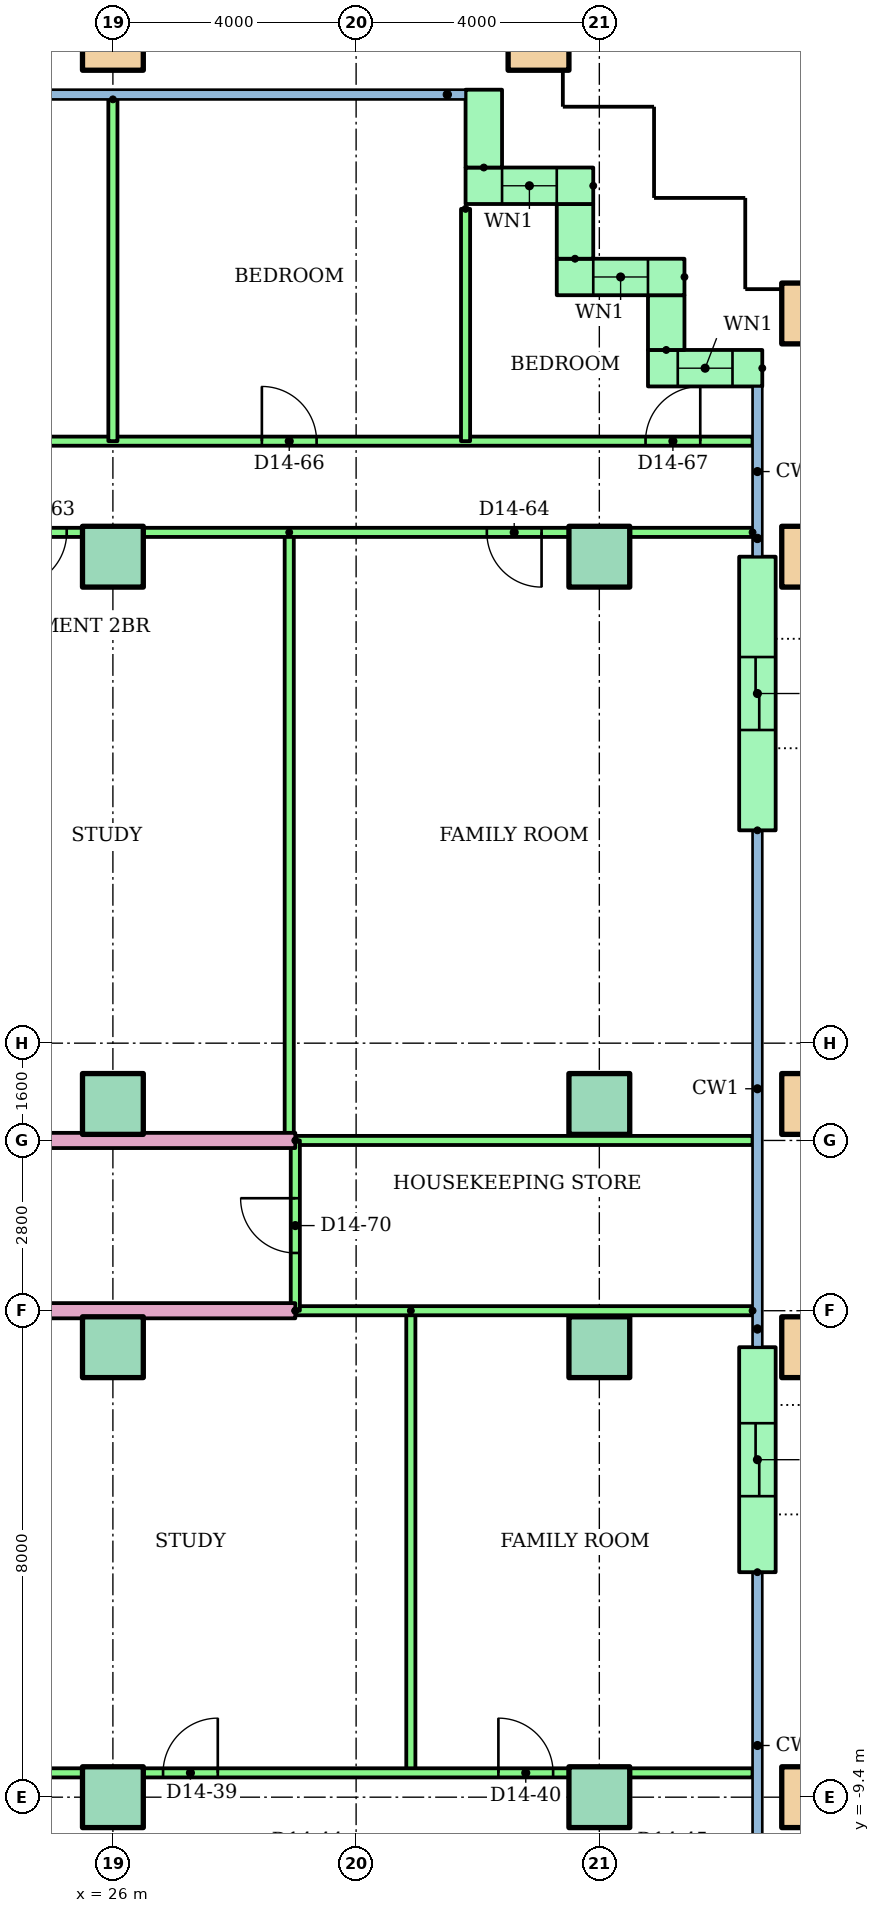
"""IFC4 building model, lengths in metres.
Left out: names, types, materials, properties, quantities, classifications, styles, units other than length and angle.
Written with IfcOpenShell. Run it as: python <this file> out.ifc"""

import sys

from ifc_helpers import new_model, si_unit, direction, frame, frame_2d, origin, origin_2d, place, context, subcontext, project, spatial, rectangle, hollow_rectangle, extrude, element, fill, save


model = new_model("IFC4")
c1 = context("Model", 3, precision=1e-05, world=origin(), true_north=direction((0.0, 1.0)))
c2 = subcontext(c1, "Body", "Model", "MODEL_VIEW")
j1 = project(units=[si_unit("LENGTHUNIT", "METRE"), si_unit("PLANEANGLEUNIT", "RADIAN")], contexts=[c1])
p1 = place(None, origin())
s1 = spatial("IfcSite", under=j1, at=p1, CompositionType="ELEMENT")
p2 = place(p1, origin())
s2 = spatial("IfcBuilding", under=s1, at=p2, CompositionType="ELEMENT")
p3 = place(p2, frame((0.0, 0.0, 54.4)))
s3 = spatial("IfcBuildingStorey", under=s2, at=p3, CompositionType="ELEMENT", Elevation=54.4)
for number, where in (
    (1, (26.0, -9.4, 0.0)),
    (2, (34.0, -9.4, 0.0)),
):
    element("IfcColumn", number, at=place(p3, frame(where)), inside=s3, PredefinedType="COLUMN", context=c2, shape_type="SweptSolid", body=[
        extrude(rectangle(XDim=1.0, YDim=1.0, at=origin_2d()), origin(), (0.0, 0.0, 1.0), 3.2),
    ])
p4 = place(p3, frame((37.5, -9.4, 0.0)))
e3 = element("IfcColumn", 3, at=p4, inside=s3, PredefinedType="COLUMN", context=c2, shape_type="SweptSolid", body=[
    extrude(hollow_rectangle(XDim=1.0, YDim=1.0, WallThickness=0.05, at=origin_2d()), origin(), (0.0, 0.0, 1.0), 3.2),
])
for number, where in (
    (4, (26.0, -2.0, 0.0)),
    (5, (34.0, -2.0, 0.0)),
):
    element("IfcColumn", number, at=place(p3, frame(where)), inside=s3, PredefinedType="COLUMN", context=c2, shape_type="SweptSolid", body=[
        extrude(rectangle(XDim=1.0, YDim=1.0, at=origin_2d()), origin(), (0.0, 0.0, 1.0), 3.2),
    ])
p5 = place(p3, frame((37.5, -2.0, 0.0)))
e6 = element("IfcColumn", 6, at=p5, inside=s3, PredefinedType="COLUMN", context=c2, shape_type="SweptSolid", body=[
    extrude(hollow_rectangle(XDim=1.0, YDim=1.0, WallThickness=0.05, at=origin_2d()), origin(), (0.0, 0.0, 1.0), 3.2),
])
for number, where in (
    (7, (26.0, 2.0, 0.0)),
    (8, (34.0, 2.0, 0.0)),
):
    element("IfcColumn", number, at=place(p3, frame(where)), inside=s3, PredefinedType="COLUMN", context=c2, shape_type="SweptSolid", body=[
        extrude(rectangle(XDim=1.0, YDim=1.0, at=origin_2d()), origin(), (0.0, 0.0, 1.0), 3.2),
    ])
p6 = place(p3, frame((37.5, 2.0, 0.0)))
e9 = element("IfcColumn", 9, at=p6, inside=s3, PredefinedType="COLUMN", context=c2, shape_type="SweptSolid", body=[
    extrude(hollow_rectangle(XDim=1.0, YDim=1.0, WallThickness=0.05, at=origin_2d()), origin(), (0.0, 0.0, 1.0), 3.2),
])
for number, where in (
    (10, (26.0, 11.0, 0.0)),
    (11, (34.0, 11.0, 0.0)),
):
    element("IfcColumn", number, at=place(p3, frame(where)), inside=s3, PredefinedType="COLUMN", context=c2, shape_type="SweptSolid", body=[
        extrude(rectangle(XDim=1.0, YDim=1.0, at=origin_2d()), origin(), (0.0, 0.0, 1.0), 3.2),
    ])
for number, where in (
    (12, (37.5, 11.0, 0.0)),
    (13, (37.5, 15.0, 0.0)),
    (14, (26.0, 19.5, 0.0)),
    (15, (33.0, 19.5, 0.0)),
):
    element("IfcColumn", number, at=place(p3, frame(where)), inside=s3, PredefinedType="COLUMN", context=c2, shape_type="SweptSolid", body=[
        extrude(hollow_rectangle(XDim=1.0, YDim=1.0, WallThickness=0.05, at=origin_2d()), origin(), (0.0, 0.0, 1.0), 3.2),
    ])
p7 = place(p3, frame((36.68, 14.1, 0.0), z_axis=(0.0, 0.0, 1.0), x_axis=(-1.0, 0.0, 0.0)))
e16 = element("IfcWall", 16, at=p7, inside=s3, PredefinedType="STANDARD", context=c2, shape_type="SweptSolid", body=[
    extrude(rectangle(XDim=1.88, YDim=0.6, at=frame_2d((0.94, 0.0))), origin(), (0.0, 0.0, 1.0), 2.92),
])
p8 = place(p7, frame((0.49, 0.0, 0.9)))
e17 = element("IfcOpeningElement", 17, at=p8, cuts=e16, PredefinedType="OPENING", context=c2, shape_type="SweptSolid", body=[
    extrude(rectangle(XDim=0.9, YDim=1.5, at=frame_2d((0.45, 0.75))), frame((0.0, 0.31, 0.0), z_axis=(0.0, -1.0, 0.0), x_axis=(1.0, 0.0, 0.0)), (0.0, 0.0, 1.0), 0.62),
])
p9 = place(p3, frame((35.1, 14.4, 0.0), z_axis=(0.0, 0.0, 1.0), x_axis=(0.0, 1.0, 0.0)))
e18 = element("IfcWall", 18, at=p9, inside=s3, PredefinedType="STANDARD", context=c2, shape_type="SweptSolid", body=[
    extrude(rectangle(XDim=0.9, YDim=0.6, at=frame_2d((0.45, 0.0))), origin(), (0.0, 0.0, 1.0), 2.92),
])
p10 = place(p3, frame((35.4, 15.6, 0.0), z_axis=(0.0, 0.0, 1.0), x_axis=(-1.0, 0.0, 0.0)))
e19 = element("IfcWall", 19, at=p10, inside=s3, PredefinedType="STANDARD", context=c2, shape_type="SweptSolid", body=[
    extrude(rectangle(XDim=2.1, YDim=0.6, at=frame_2d((1.05, 0.0))), origin(), (0.0, 0.0, 1.0), 2.92),
])
p11 = place(p10, frame((0.6, 0.0, 0.9)))
e20 = element("IfcOpeningElement", 20, at=p11, cuts=e19, PredefinedType="OPENING", context=c2, shape_type="SweptSolid", body=[
    extrude(rectangle(XDim=0.9, YDim=1.5, at=frame_2d((0.45, 0.75))), frame((0.0, 0.31, 0.0), z_axis=(0.0, -1.0, 0.0), x_axis=(1.0, 0.0, 0.0)), (0.0, 0.0, 1.0), 0.62),
])
p12 = place(p3, frame((33.6, 15.9, 0.0), z_axis=(0.0, 0.0, 1.0), x_axis=(0.0, 1.0, 0.0)))
e21 = element("IfcWall", 21, at=p12, inside=s3, PredefinedType="STANDARD", context=c2, shape_type="SweptSolid", body=[
    extrude(rectangle(XDim=0.9, YDim=0.6, at=frame_2d((0.45, 0.0))), origin(), (0.0, 0.0, 1.0), 2.92),
])
p13 = place(p3, frame((33.9, 17.1, 0.0), z_axis=(0.0, 0.0, 1.0), x_axis=(-1.0, 0.0, 0.0)))
e22 = element("IfcWall", 22, at=p13, inside=s3, PredefinedType="STANDARD", context=c2, shape_type="SweptSolid", body=[
    extrude(rectangle(XDim=2.1, YDim=0.6, at=frame_2d((1.05, 0.0))), origin(), (0.0, 0.0, 1.0), 2.92),
])
p14 = place(p13, frame((0.6, 0.0, 0.9)))
e23 = element("IfcOpeningElement", 23, at=p14, cuts=e22, PredefinedType="OPENING", context=c2, shape_type="SweptSolid", body=[
    extrude(rectangle(XDim=0.9, YDim=1.5, at=frame_2d((0.45, 0.75))), frame((0.0, 0.31, 0.0), z_axis=(0.0, -1.0, 0.0), x_axis=(1.0, 0.0, 0.0)), (0.0, 0.0, 1.0), 0.62),
])
p15 = place(p3, frame((32.1, 17.4, 0.0), z_axis=(0.0, 0.0, 1.0), x_axis=(0.0, 1.0, 0.0)))
e24 = element("IfcWall", 24, at=p15, inside=s3, PredefinedType="STANDARD", context=c2, shape_type="SweptSolid", body=[
    extrude(rectangle(XDim=1.28, YDim=0.6, at=frame_2d((0.64, 0.0))), origin(), (0.0, 0.0, 1.0), 2.92),
])
p16 = place(p3, frame((36.6, -5.7, 0.0), z_axis=(0.0, 0.0, 1.0), x_axis=(0.0, 1.0, 0.0)))
e25 = element("IfcWall", 25, at=p16, inside=s3, PredefinedType="STANDARD", context=c2, shape_type="SweptSolid", body=[
    extrude(rectangle(XDim=3.7, YDim=0.6, at=frame_2d((1.85, 0.0))), origin(), (0.0, 0.0, 1.0), 2.92),
])
p17 = place(p16, frame((1.25, 0.0, 0.0)))
e26 = element("IfcOpeningElement", 26, at=p17, cuts=e25, PredefinedType="OPENING", context=c2, shape_type="SweptSolid", body=[
    extrude(rectangle(XDim=1.2, YDim=2.1, at=frame_2d((0.6, 1.05))), frame((0.0, 0.31, 0.0), z_axis=(0.0, -1.0, 0.0), x_axis=(1.0, 0.0, 0.0)), (0.0, 0.0, 1.0), 0.62),
])
p18 = place(p3, frame((36.6, 6.5, 0.0), z_axis=(0.0, 0.0, 1.0), x_axis=(0.0, 1.0, 0.0)))
e27 = element("IfcWall", 27, at=p18, inside=s3, PredefinedType="STANDARD", context=c2, shape_type="SweptSolid", body=[
    extrude(rectangle(XDim=4.5, YDim=0.6, at=frame_2d((2.25, 0.0))), origin(), (0.0, 0.0, 1.0), 2.92),
])
p19 = place(p18, frame((1.65, 0.0, 0.0)))
e28 = element("IfcOpeningElement", 28, at=p19, cuts=e27, PredefinedType="OPENING", context=c2, shape_type="SweptSolid", body=[
    extrude(rectangle(XDim=1.2, YDim=2.1, at=frame_2d((0.6, 1.05))), frame((0.0, 0.31, 0.0), z_axis=(0.0, -1.0, 0.0), x_axis=(1.0, 0.0, 0.0)), (0.0, 0.0, 1.0), 0.62),
])
p20 = place(p3, frame((30.9, -1.4, 0.0), z_axis=(0.0, 0.0, 1.0), x_axis=(0.0, -1.0, 0.0)))
e29 = element("IfcWall", 29, at=p20, inside=s3, PredefinedType="PARTITIONING", context=c2, shape_type="SweptSolid", body=[
    extrude(rectangle(XDim=7.6, YDim=0.15, at=frame_2d((3.8, 0.0))), origin(), (0.0, 0.0, 1.0), 2.4),
])
p21 = place(p3, frame((12.0, -9.0, 0.0)))
e30 = element("IfcWall", 30, at=p21, inside=s3, PredefinedType="PARTITIONING", context=c2, shape_type="SweptSolid", body=[
    extrude(rectangle(XDim=24.52, YDim=0.15, at=frame_2d((12.26, 0.0))), origin(), (0.0, 0.0, 1.0), 2.4),
])
p22 = place(p21, frame((6.76, 0.0, 0.0)))
e31 = element("IfcOpeningElement", 31, at=p22, cuts=e30, PredefinedType="OPENING", context=c2, shape_type="SweptSolid", body=[
    extrude(rectangle(XDim=0.9, YDim=2.1, at=frame_2d((0.45, 1.05))), frame((0.0, 0.085, 0.0), z_axis=(0.0, -1.0, 0.0), x_axis=(1.0, 0.0, 0.0)), (0.0, 0.0, 1.0), 0.17),
])
p23 = place(p21, frame((14.825, 0.0, 0.0)))
e32 = element("IfcOpeningElement", 32, at=p23, cuts=e30, PredefinedType="OPENING", context=c2, shape_type="SweptSolid", body=[
    extrude(rectangle(XDim=0.9, YDim=2.1, at=frame_2d((0.45, 1.05))), frame((0.0, 0.085, 0.0), z_axis=(0.0, -1.0, 0.0), x_axis=(1.0, 0.0, 0.0)), (0.0, 0.0, 1.0), 0.17),
])
p24 = place(p21, frame((20.34, 0.0, 0.0)))
e33 = element("IfcOpeningElement", 33, at=p24, cuts=e30, PredefinedType="OPENING", context=c2, shape_type="SweptSolid", body=[
    extrude(rectangle(XDim=0.9, YDim=2.1, at=frame_2d((0.45, 1.05))), frame((0.0, 0.085, 0.0), z_axis=(0.0, -1.0, 0.0), x_axis=(1.0, 0.0, 0.0)), (0.0, 0.0, 1.0), 0.17),
])
p25 = place(p3, frame((29.0, -1.4, 0.0), z_axis=(0.0, 0.0, 1.0), x_axis=(-1.0, 0.0, 0.0)))
e34 = element("IfcWall", 34, at=p25, inside=s3, PredefinedType="PARTITIONING", context=c2, shape_type="SweptSolid", body=[
    extrude(rectangle(XDim=15.0, YDim=0.25, at=frame_2d((7.5, 0.0))), origin(), (0.0, 0.0, 1.0), 2.4),
])
p26 = place(p3, frame((36.52, -1.4, 0.0), z_axis=(0.0, 0.0, 1.0), x_axis=(-1.0, 0.0, 0.0)))
e35 = element("IfcWall", 35, at=p26, inside=s3, PredefinedType="PARTITIONING", context=c2, shape_type="SweptSolid", body=[
    extrude(rectangle(XDim=7.52, YDim=0.15, at=frame_2d((3.76, 0.0))), origin(), (0.0, 0.0, 1.0), 2.4),
])
p27 = place(p3, frame((28.9, 11.4, 0.0), z_axis=(0.0, 0.0, 1.0), x_axis=(0.0, -1.0, 0.0)))
e36 = element("IfcWall", 36, at=p27, inside=s3, PredefinedType="PARTITIONING", context=c2, shape_type="SweptSolid", body=[
    extrude(rectangle(XDim=10.0, YDim=0.15, at=frame_2d((5.0, 0.0))), origin(), (0.0, 0.0, 1.0), 2.4),
])
p28 = place(p3, frame((36.52, 11.4, 0.0), z_axis=(0.0, 0.0, 1.0), x_axis=(-1.0, 0.0, 0.0)))
e37 = element("IfcWall", 37, at=p28, inside=s3, PredefinedType="PARTITIONING", context=c2, shape_type="SweptSolid", body=[
    extrude(rectangle(XDim=20.52, YDim=0.15, at=frame_2d((10.26, 0.0))), origin(), (0.0, 0.0, 1.0), 2.4),
])
p29 = place(p28, frame((15.42, 0.0, 0.0)))
e38 = element("IfcOpeningElement", 38, at=p29, cuts=e37, PredefinedType="OPENING", context=c2, shape_type="SweptSolid", body=[
    extrude(rectangle(XDim=0.9, YDim=2.1, at=frame_2d((0.45, 1.05))), frame((0.0, 0.085, 0.0), z_axis=(0.0, -1.0, 0.0), x_axis=(1.0, 0.0, 0.0)), (0.0, 0.0, 1.0), 0.17),
])
p30 = place(p28, frame((11.28, 0.0, 0.0)))
e39 = element("IfcOpeningElement", 39, at=p30, cuts=e37, PredefinedType="OPENING", context=c2, shape_type="SweptSolid", body=[
    extrude(rectangle(XDim=0.9, YDim=2.1, at=frame_2d((0.45, 1.05))), frame((0.0, 0.085, 0.0), z_axis=(0.0, -1.0, 0.0), x_axis=(1.0, 0.0, 0.0)), (0.0, 0.0, 1.0), 0.17),
])
p31 = place(p28, frame((3.47, 0.0, 0.0)))
e40 = element("IfcOpeningElement", 40, at=p31, cuts=e37, PredefinedType="OPENING", context=c2, shape_type="SweptSolid", body=[
    extrude(rectangle(XDim=0.9, YDim=2.1, at=frame_2d((0.45, 1.05))), frame((0.0, 0.085, 0.0), z_axis=(0.0, -1.0, 0.0), x_axis=(1.0, 0.0, 0.0)), (0.0, 0.0, 1.0), 0.17),
])
p32 = place(p3, frame((14.0, 12.9, 0.0)))
e41 = element("IfcWall", 41, at=p32, inside=s3, PredefinedType="PARTITIONING", context=c2, shape_type="SweptSolid", body=[
    extrude(rectangle(XDim=22.52, YDim=0.15, at=frame_2d((11.26, 0.0))), origin(), (0.0, 0.0, 1.0), 2.4),
])
p33 = place(p32, frame((5.5, 0.0, 0.0)))
e42 = element("IfcOpeningElement", 42, at=p33, cuts=e41, PredefinedType="OPENING", context=c2, shape_type="SweptSolid", body=[
    extrude(rectangle(XDim=1.0, YDim=2.1, at=frame_2d((0.5, 1.05))), frame((0.0, 0.085, 0.0), z_axis=(0.0, -1.0, 0.0), x_axis=(1.0, 0.0, 0.0)), (0.0, 0.0, 1.0), 0.17),
])
p34 = place(p32, frame((14.45, 0.0, 0.0)))
e43 = element("IfcOpeningElement", 43, at=p34, cuts=e41, PredefinedType="OPENING", context=c2, shape_type="SweptSolid", body=[
    extrude(rectangle(XDim=0.9, YDim=2.1, at=frame_2d((0.45, 1.05))), frame((0.0, 0.085, 0.0), z_axis=(0.0, -1.0, 0.0), x_axis=(1.0, 0.0, 0.0)), (0.0, 0.0, 1.0), 0.17),
])
p35 = place(p32, frame((20.76, 0.0, 0.0)))
e44 = element("IfcOpeningElement", 44, at=p35, cuts=e41, PredefinedType="OPENING", context=c2, shape_type="SweptSolid", body=[
    extrude(rectangle(XDim=0.9, YDim=2.1, at=frame_2d((0.45, 1.05))), frame((0.0, 0.085, 0.0), z_axis=(0.0, -1.0, 0.0), x_axis=(1.0, 0.0, 0.0)), (0.0, 0.0, 1.0), 0.17),
])
p36 = place(p3, frame((26.0, 18.521, 0.0), z_axis=(0.0, 0.0, 1.0), x_axis=(0.0, -1.0, 0.0)))
e45 = element("IfcWall", 45, at=p36, inside=s3, PredefinedType="PARTITIONING", context=c2, shape_type="SweptSolid", body=[
    extrude(rectangle(XDim=5.621, YDim=0.15, at=frame_2d((2.811, 0.0))), origin(), (0.0, 0.0, 1.0), 2.4),
])
p37 = place(p3, frame((31.8, 16.72, 0.0), z_axis=(0.0, 0.0, 1.0), x_axis=(0.0, -1.0, 0.0)))
e46 = element("IfcWall", 46, at=p37, inside=s3, PredefinedType="PARTITIONING", context=c2, shape_type="SweptSolid", body=[
    extrude(rectangle(XDim=3.82, YDim=0.15, at=frame_2d((1.91, 0.0))), origin(), (0.0, 0.0, 1.0), 2.4),
])
p38 = place(p3, frame((14.0, 1.4, 0.0)))
e47 = element("IfcWall", 47, at=p38, inside=s3, PredefinedType="PARTITIONING", context=c2, shape_type="SweptSolid", body=[
    extrude(rectangle(XDim=15.0, YDim=0.25, at=frame_2d((7.5, 0.0))), origin(), (0.0, 0.0, 1.0), 2.4),
])
p39 = place(p38, frame((0.5, 0.0, 0.0)))
e48 = element("IfcOpeningElement", 48, at=p39, cuts=e47, PredefinedType="OPENING", context=c2, shape_type="SweptSolid", body=[
    extrude(rectangle(XDim=1.0, YDim=2.1, at=frame_2d((0.5, 1.05))), frame((0.0, 0.135, 0.0), z_axis=(0.0, -1.0, 0.0), x_axis=(1.0, 0.0, 0.0)), (0.0, 0.0, 1.0), 0.27),
])
p40 = place(p3, frame((29.0, 1.4, 0.0)))
e49 = element("IfcWall", 49, at=p40, inside=s3, PredefinedType="PARTITIONING", context=c2, shape_type="SweptSolid", body=[
    extrude(rectangle(XDim=7.52, YDim=0.15, at=frame_2d((3.76, 0.0))), origin(), (0.0, 0.0, 1.0), 2.4),
])
p41 = place(p3, frame((29.0, -1.4, 0.0), z_axis=(0.0, 0.0, 1.0), x_axis=(0.0, 1.0, 0.0)))
e50 = element("IfcWall", 50, at=p41, inside=s3, PredefinedType="PARTITIONING", context=c2, shape_type="SweptSolid", body=[
    extrude(rectangle(XDim=2.8, YDim=0.15, at=frame_2d((1.4, 0.0))), origin(), (0.0, 0.0, 1.0), 2.4),
])
p42 = place(p41, frame((0.95, 0.0, 0.0)))
e51 = element("IfcOpeningElement", 51, at=p42, cuts=e50, PredefinedType="OPENING", context=c2, shape_type="SweptSolid", body=[
    extrude(rectangle(XDim=0.9, YDim=2.1, at=frame_2d((0.45, 1.05))), frame((0.0, 0.085, 0.0), z_axis=(0.0, -1.0, 0.0), x_axis=(1.0, 0.0, 0.0)), (0.0, 0.0, 1.0), 0.17),
])
p43 = place(p8, origin())
e52 = element("IfcWindow", 52, at=p43, inside=s3, PartitioningType="SINGLE_PANEL", PredefinedType="WINDOW", context=c2, shape_type="SweptSolid", body=[
    extrude(rectangle(XDim=0.9, YDim=1.5, at=frame_2d((0.45, 0.75))), frame((0.0, 0.03, 0.0), z_axis=(0.0, -1.0, 0.0), x_axis=(1.0, 0.0, 0.0)), (0.0, 0.0, 1.0), 0.06),
])
fill(e17, e52)
p44 = place(p11, origin())
e53 = element("IfcWindow", 53, at=p44, inside=s3, PartitioningType="SINGLE_PANEL", PredefinedType="WINDOW", context=c2, shape_type="SweptSolid", body=[
    extrude(rectangle(XDim=0.9, YDim=1.5, at=frame_2d((0.45, 0.75))), frame((0.0, 0.03, 0.0), z_axis=(0.0, -1.0, 0.0), x_axis=(1.0, 0.0, 0.0)), (0.0, 0.0, 1.0), 0.06),
])
fill(e20, e53)
p45 = place(p14, origin())
e54 = element("IfcWindow", 54, at=p45, inside=s3, PartitioningType="SINGLE_PANEL", PredefinedType="WINDOW", context=c2, shape_type="SweptSolid", body=[
    extrude(rectangle(XDim=0.9, YDim=1.5, at=frame_2d((0.45, 0.75))), frame((0.0, 0.03, 0.0), z_axis=(0.0, -1.0, 0.0), x_axis=(1.0, 0.0, 0.0)), (0.0, 0.0, 1.0), 0.06),
])
fill(e23, e54)
p46 = place(p23, origin())
e55 = element("IfcDoor", 55, at=p46, inside=s3, OperationType="SINGLE_SWING_RIGHT", PredefinedType="DOOR", context=c2, shape_type="SweptSolid", body=[
    extrude(rectangle(XDim=0.9, YDim=2.1, at=frame_2d((0.45, 1.05))), frame((0.0, 0.025, 0.0), z_axis=(0.0, -1.0, 0.0), x_axis=(1.0, 0.0, 0.0)), (0.0, 0.0, 1.0), 0.05),
])
fill(e32, e55)
p47 = place(p24, origin())
e56 = element("IfcDoor", 56, at=p47, inside=s3, OperationType="SINGLE_SWING_LEFT", PredefinedType="DOOR", context=c2, shape_type="SweptSolid", body=[
    extrude(rectangle(XDim=0.9, YDim=2.1, at=frame_2d((0.45, 1.05))), frame((0.0, 0.025, 0.0), z_axis=(0.0, -1.0, 0.0), x_axis=(1.0, 0.0, 0.0)), (0.0, 0.0, 1.0), 0.05),
])
fill(e33, e56)
p48 = place(p30, origin())
e57 = element("IfcDoor", 57, at=p48, inside=s3, OperationType="SINGLE_SWING_RIGHT", PredefinedType="DOOR", context=c2, shape_type="SweptSolid", body=[
    extrude(rectangle(XDim=0.9, YDim=2.1, at=frame_2d((0.45, 1.05))), frame((0.0, 0.025, 0.0), z_axis=(0.0, -1.0, 0.0), x_axis=(1.0, 0.0, 0.0)), (0.0, 0.0, 1.0), 0.05),
])
fill(e39, e57)
p49 = place(p31, origin())
e58 = element("IfcDoor", 58, at=p49, inside=s3, OperationType="SINGLE_SWING_LEFT", PredefinedType="DOOR", context=c2, shape_type="SweptSolid", body=[
    extrude(rectangle(XDim=0.9, YDim=2.1, at=frame_2d((0.45, 1.05))), frame((0.0, 0.025, 0.0), z_axis=(0.0, -1.0, 0.0), x_axis=(1.0, 0.0, 0.0)), (0.0, 0.0, 1.0), 0.05),
])
fill(e40, e58)
p50 = place(p34, origin())
e59 = element("IfcDoor", 59, at=p50, inside=s3, OperationType="SINGLE_SWING_LEFT", PredefinedType="DOOR", context=c2, shape_type="SweptSolid", body=[
    extrude(rectangle(XDim=0.9, YDim=2.1, at=frame_2d((0.45, 1.05))), frame((0.0, 0.025, 0.0), z_axis=(0.0, -1.0, 0.0), x_axis=(1.0, 0.0, 0.0)), (0.0, 0.0, 1.0), 0.05),
])
fill(e43, e59)
p51 = place(p35, origin())
e60 = element("IfcDoor", 60, at=p51, inside=s3, OperationType="SINGLE_SWING_RIGHT", PredefinedType="DOOR", context=c2, shape_type="SweptSolid", body=[
    extrude(rectangle(XDim=0.9, YDim=2.1, at=frame_2d((0.45, 1.05))), frame((0.0, 0.025, 0.0), z_axis=(0.0, -1.0, 0.0), x_axis=(1.0, 0.0, 0.0)), (0.0, 0.0, 1.0), 0.05),
])
fill(e44, e60)
p52 = place(p42, origin())
e61 = element("IfcDoor", 61, at=p52, inside=s3, OperationType="SINGLE_SWING_RIGHT", PredefinedType="DOOR", context=c2, shape_type="SweptSolid", body=[
    extrude(rectangle(XDim=0.9, YDim=2.1, at=frame_2d((0.45, 1.05))), frame((0.0, 0.025, 0.0), z_axis=(0.0, -1.0, 0.0), x_axis=(1.0, 0.0, 0.0)), (0.0, 0.0, 1.0), 0.05),
])
fill(e51, e61)
p53 = place(p17, origin())
e62 = element("IfcDoor", 62, at=p53, inside=s3, OperationType="SLIDING_TO_LEFT", PredefinedType="DOOR", context=c2, shape_type="SweptSolid", body=[
    extrude(rectangle(XDim=1.2, YDim=2.1, at=frame_2d((0.6, 1.05))), frame((0.0, 0.025, 0.0), z_axis=(0.0, -1.0, 0.0), x_axis=(1.0, 0.0, 0.0)), (0.0, 0.0, 1.0), 0.05),
])
fill(e26, e62)
p54 = place(p19, origin())
e63 = element("IfcDoor", 63, at=p54, inside=s3, OperationType="SLIDING_TO_LEFT", PredefinedType="DOOR", context=c2, shape_type="SweptSolid", body=[
    extrude(rectangle(XDim=1.2, YDim=2.1, at=frame_2d((0.6, 1.05))), frame((0.0, 0.025, 0.0), z_axis=(0.0, -1.0, 0.0), x_axis=(1.0, 0.0, 0.0)), (0.0, 0.0, 1.0), 0.05),
])
fill(e28, e63)
save(model, sys.argv[1])
